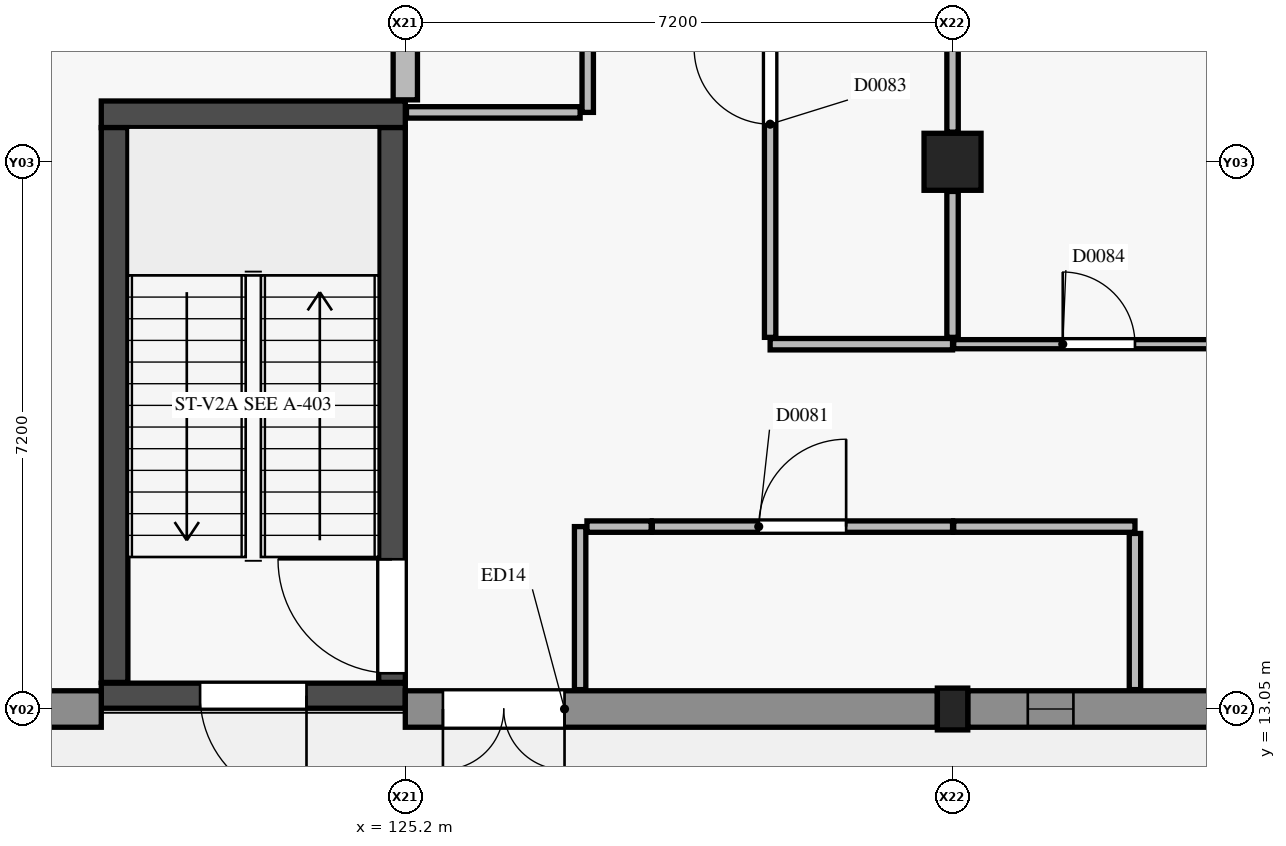
"""IFC4 building model, lengths in metres.
Left out: names, types, materials, properties, quantities, classifications, styles, units other than length and angle.
Written with IfcOpenShell. Run it as: python <this file> out.ifc"""

import sys

from ifc_helpers import new_model, si_unit, direction, frame, frame_2d, origin, origin_2d, place, context, subcontext, project, spatial, rectangle, extrude, element, fill, save


model = new_model("IFC4")
c1 = context("Model", 3, precision=1e-05, world=origin(), true_north=direction((0.0, 1.0)))
c2 = subcontext(c1, "Body", "Model", "MODEL_VIEW")
j1 = project(units=[si_unit("LENGTHUNIT", "METRE"), si_unit("PLANEANGLEUNIT", "RADIAN")], contexts=[c1])
p1 = place(None, origin())
s1 = spatial("IfcSite", under=j1, at=p1, CompositionType="ELEMENT")
p2 = place(p1, origin())
s2 = spatial("IfcBuilding", under=s1, at=p2, CompositionType="ELEMENT")
p3 = place(p2, origin())
s3 = spatial("IfcBuildingStorey", under=s2, at=p3, CompositionType="ELEMENT", Elevation=0.0)
p4 = place(p3, frame((132.4, 13.05, 0.0), z_axis=(0.0, 0.0, 1.0), x_axis=(1.0, 0.0, 0.0)))
e1 = element("IfcColumn", 1, at=p4, inside=s3, PredefinedType="COLUMN", context=c2, shape_type="SweptSolid", body=[
    extrude(rectangle(XDim=0.4, YDim=0.55, at=origin_2d()), origin(), (0.0, 0.0, 1.0), 4.8),
])
p5 = place(p3, frame((132.4, 20.25, 0.0), z_axis=(0.0, 0.0, 1.0), x_axis=(1.0, 0.0, 0.0)))
e2 = element("IfcColumn", 2, at=p5, inside=s3, PredefinedType="COLUMN", context=c2, shape_type="SweptSolid", body=[
    extrude(rectangle(XDim=0.75, YDim=0.75, at=origin_2d()), origin(), (0.0, 0.0, 1.0), 4.8),
])
p6 = place(p3, frame((125.2, 13.225, 0.0), z_axis=(0.0, 0.0, 1.0), x_axis=(-1.0, 0.0, 0.0)))
e3 = element("IfcWall", 3, at=p6, inside=s3, PredefinedType="SHEAR", context=c2, shape_type="SweptSolid", body=[
    extrude(rectangle(XDim=4.0, YDim=0.33, at=frame_2d((2.0, 0.0))), origin(), (0.0, 0.0, 1.0), 4.46),
])
p7 = place(p6, frame((1.3, 0.0, 0.0)))
e4 = element("IfcOpeningElement", 4, at=p7, cuts=e3, PredefinedType="OPENING", context=c2, shape_type="SweptSolid", body=[
    extrude(rectangle(XDim=1.4, YDim=2.25, at=frame_2d((0.7, 1.125))), frame((0.0, 0.175, 0.0), z_axis=(0.0, -1.0, 0.0), x_axis=(1.0, 0.0, 0.0)), (0.0, 0.0, 1.0), 0.35),
])
p8 = place(p3, frame((121.2, 20.875, 0.0), z_axis=(0.0, 0.0, 1.0), x_axis=(1.0, 0.0, 0.0)))
e5 = element("IfcWall", 5, at=p8, inside=s3, PredefinedType="SHEAR", context=c2, shape_type="SweptSolid", body=[
    extrude(rectangle(XDim=4.0, YDim=0.35, at=frame_2d((2.0, 0.0))), origin(), (0.0, 0.0, 1.0), 4.46),
])
p9 = place(p3, frame((121.375, 13.4, 0.0), z_axis=(0.0, 0.0, 1.0), x_axis=(0.0, 1.0, 0.0)))
e6 = element("IfcWall", 6, at=p9, inside=s3, PredefinedType="SHEAR", context=c2, shape_type="SweptSolid", body=[
    extrude(rectangle(XDim=7.3, YDim=0.35, at=frame_2d((3.65, 0.0))), origin(), (0.0, 0.0, 1.0), 4.46),
])
p10 = place(p3, frame((125.025, 13.4, 0.0), z_axis=(0.0, 0.0, 1.0), x_axis=(0.0, 1.0, 0.0)))
e7 = element("IfcWall", 7, at=p10, inside=s3, PredefinedType="SHEAR", context=c2, shape_type="SweptSolid", body=[
    extrude(rectangle(XDim=7.3, YDim=0.35, at=frame_2d((3.65, 0.0))), origin(), (0.0, 0.0, 1.0), 4.46),
])
p11 = place(p10, frame((0.12, 0.0, 0.0)))
e8 = element("IfcOpeningElement", 8, at=p11, cuts=e7, PredefinedType="OPENING", context=c2, shape_type="SweptSolid", body=[
    extrude(rectangle(XDim=1.5, YDim=2.15, at=frame_2d((0.75, 1.075))), frame((0.0, 0.185, 0.0), z_axis=(0.0, -1.0, 0.0), x_axis=(1.0, 0.0, 0.0)), (0.0, 0.0, 1.0), 0.37),
])
p12 = place(p3, frame((135.81, 13.05, 0.0), z_axis=(0.0, 0.0, 1.0), x_axis=(-1.0, 0.0, 0.0)))
e9 = element("IfcWall", 9, at=p12, inside=s3, PredefinedType="SOLIDWALL", context=c2, shape_type="SweptSolid", body=[
    extrude(rectangle(XDim=3.21, YDim=0.48, at=frame_2d((1.605, 0.0))), origin(), (0.0, 0.0, 1.0), 3.64),
])
p13 = place(p12, frame((1.82, 0.0, 0.9)))
e10 = element("IfcOpeningElement", 10, at=p13, cuts=e9, PredefinedType="OPENING", context=c2, shape_type="SweptSolid", body=[
    extrude(rectangle(XDim=0.6, YDim=1.8, at=frame_2d((0.3, 0.9))), frame((0.0, 0.25, 0.0), z_axis=(0.0, -1.0, 0.0), x_axis=(1.0, 0.0, 0.0)), (0.0, 0.0, 1.0), 0.5),
])
p14 = place(p3, frame((132.2, 13.05, 0.0), z_axis=(0.0, 0.0, 1.0), x_axis=(-1.0, 0.0, 0.0)))
e11 = element("IfcWall", 11, at=p14, inside=s3, PredefinedType="SOLIDWALL", context=c2, shape_type="SweptSolid", body=[
    extrude(rectangle(XDim=7.0, YDim=0.48, at=frame_2d((3.5, 0.0))), origin(), (0.0, 0.0, 1.0), 3.64),
])
p15 = place(p14, frame((4.905, 0.0, 0.0)))
e12 = element("IfcOpeningElement", 12, at=p15, cuts=e11, PredefinedType="OPENING", context=c2, shape_type="SweptSolid", body=[
    extrude(rectangle(XDim=1.6, YDim=2.3, at=frame_2d((0.8, 1.15))), frame((0.0, 0.25, 0.0), z_axis=(0.0, -1.0, 0.0), x_axis=(1.0, 0.0, 0.0)), (0.0, 0.0, 1.0), 0.5),
])
p16 = place(p3, frame((121.2, 13.05, 0.0), z_axis=(0.0, 0.0, 1.0), x_axis=(-1.0, 0.0, 0.0)))
e13 = element("IfcWall", 13, at=p16, inside=s3, PredefinedType="SOLIDWALL", context=c2, shape_type="SweptSolid", body=[
    extrude(rectangle(XDim=2.9, YDim=0.48, at=frame_2d((1.45, 0.0))), origin(), (0.0, 0.0, 1.0), 3.64),
])
p17 = place(p16, frame((1.075, 0.0, 0.9)))
e14 = element("IfcOpeningElement", 14, at=p17, cuts=e13, PredefinedType="OPENING", context=c2, shape_type="SweptSolid", body=[
    extrude(rectangle(XDim=0.75, YDim=1.8, at=frame_2d((0.375, 0.9))), frame((0.0, 0.25, 0.0), z_axis=(0.0, -1.0, 0.0), x_axis=(1.0, 0.0, 0.0)), (0.0, 0.0, 1.0), 0.5),
])
p18 = place(p3, frame((128.45, 15.45, 0.0), z_axis=(0.0, 0.0, 1.0), x_axis=(1.0, 0.0, 0.0)))
e15 = element("IfcWall", 15, at=p18, inside=s3, PredefinedType="PARTITIONING", context=c2, shape_type="SweptSolid", body=[
    extrude(rectangle(XDim=3.95, YDim=0.15, at=frame_2d((1.975, 0.0))), origin(), (0.0, 0.0, 1.0), 3.925),
])
p19 = place(p18, frame((1.4, 0.0, 0.0)))
e16 = element("IfcOpeningElement", 16, at=p19, cuts=e15, PredefinedType="OPENING", context=c2, shape_type="SweptSolid", body=[
    extrude(rectangle(XDim=1.15, YDim=2.15, at=frame_2d((0.575, 1.075))), frame((0.0, 0.085, 0.0), z_axis=(0.0, -1.0, 0.0), x_axis=(1.0, 0.0, 0.0)), (0.0, 0.0, 1.0), 0.17),
])
p20 = place(p3, frame((132.415, 15.45, 0.0), z_axis=(0.0, 0.0, 1.0), x_axis=(1.0, 0.0, 0.0)))
e17 = element("IfcWall", 17, at=p20, inside=s3, PredefinedType="PARTITIONING", context=c2, shape_type="SweptSolid", body=[
    extrude(rectangle(XDim=2.385, YDim=0.15, at=frame_2d((1.192, 0.0))), origin(), (0.0, 0.0, 1.0), 3.925),
])
p21 = place(p3, frame((134.8, 13.305, 0.0), z_axis=(0.0, 0.0, 1.0), x_axis=(0.0, 1.0, 0.0)))
e18 = element("IfcWall", 18, at=p21, inside=s3, PredefinedType="PARTITIONING", context=c2, shape_type="SweptSolid", body=[
    extrude(rectangle(XDim=2.055, YDim=0.15, at=frame_2d((1.028, 0.0))), origin(), (0.0, 0.0, 1.0), 4.46),
])
p22 = place(p3, frame((127.5, 13.305, 0.0), z_axis=(0.0, 0.0, 1.0), x_axis=(0.0, 1.0, 0.0)))
e19 = element("IfcWall", 19, at=p22, inside=s3, PredefinedType="PARTITIONING", context=c2, shape_type="SweptSolid", body=[
    extrude(rectangle(XDim=2.145, YDim=0.15, at=frame_2d((1.073, 0.0))), origin(), (0.0, 0.0, 1.0), 4.025),
])
p23 = place(p3, frame((127.59, 15.45, 0.0), z_axis=(0.0, 0.0, 1.0), x_axis=(1.0, 0.0, 0.0)))
e20 = element("IfcWall", 20, at=p23, inside=s3, PredefinedType="PARTITIONING", context=c2, shape_type="SweptSolid", body=[
    extrude(rectangle(XDim=0.845, YDim=0.15, at=frame_2d((0.422, 0.0))), origin(), (0.0, 0.0, 1.0), 4.025),
])
p24 = place(p3, frame((130.0, 17.85, 0.0), z_axis=(0.0, 0.0, 1.0), x_axis=(1.0, 0.0, 0.0)))
e21 = element("IfcWall", 21, at=p24, inside=s3, PredefinedType="PARTITIONING", context=c2, shape_type="SweptSolid", body=[
    extrude(rectangle(XDim=2.4, YDim=0.15, at=frame_2d((1.2, 0.0))), origin(), (0.0, 0.0, 1.0), 3.925),
])
p25 = place(p3, frame((130.0, 17.94, 0.0), z_axis=(0.0, 0.0, 1.0), x_axis=(0.0, 1.0, 0.0)))
e22 = element("IfcWall", 22, at=p25, inside=s3, PredefinedType="PARTITIONING", context=c2, shape_type="SweptSolid", body=[
    extrude(rectangle(XDim=6.61, YDim=0.15, at=frame_2d((3.305, 0.0))), origin(), (0.0, 0.0, 1.0), 3.645),
])
p26 = place(p25, frame((2.805, 0.0, 0.0)))
e23 = element("IfcOpeningElement", 23, at=p26, cuts=e22, PredefinedType="OPENING", context=c2, shape_type="SweptSolid", body=[
    extrude(rectangle(XDim=1.0, YDim=2.15, at=frame_2d((0.5, 1.075))), frame((0.0, 0.085, 0.0), z_axis=(0.0, -1.0, 0.0), x_axis=(1.0, 0.0, 0.0)), (0.0, 0.0, 1.0), 0.17),
])
p27 = place(p3, frame((125.215, 20.9, 0.0), z_axis=(0.0, 0.0, 1.0), x_axis=(1.0, 0.0, 0.0)))
e24 = element("IfcWall", 24, at=p27, inside=s3, PredefinedType="PARTITIONING", context=c2, shape_type="SweptSolid", body=[
    extrude(rectangle(XDim=2.285, YDim=0.15, at=frame_2d((1.143, 0.0))), origin(), (0.0, 0.0, 1.0), 4.46),
])
p28 = place(p3, frame((127.6, 20.9, 0.0), z_axis=(0.0, 0.0, 1.0), x_axis=(0.0, 1.0, 0.0)))
e25 = element("IfcWall", 25, at=p28, inside=s3, PredefinedType="PARTITIONING", context=c2, shape_type="SweptSolid", body=[
    extrude(rectangle(XDim=9.56, YDim=0.15, at=frame_2d((4.78, 0.0))), origin(), (0.0, 0.0, 1.0), 3.795),
])
p29 = place(p28, frame((4.28, 0.0, 0.0)))
e26 = element("IfcOpeningElement", 26, at=p29, cuts=e25, PredefinedType="OPENING", context=c2, shape_type="SweptSolid", body=[
    extrude(rectangle(XDim=1.0, YDim=2.15, at=frame_2d((0.5, 1.075))), frame((0.0, 0.085, 0.0), z_axis=(0.0, -1.0, 0.0), x_axis=(1.0, 0.0, 0.0)), (0.0, 0.0, 1.0), 0.17),
])
p30 = place(p3, frame((132.415, 17.85, 0.0), z_axis=(0.0, 0.0, 1.0), x_axis=(1.0, 0.0, 0.0)))
e27 = element("IfcWall", 27, at=p30, inside=s3, PredefinedType="PARTITIONING", context=c2, shape_type="SweptSolid", body=[
    extrude(rectangle(XDim=3.82, YDim=0.12, at=frame_2d((1.91, 0.0))), origin(), (0.0, 0.0, 1.0), 3.925),
])
p31 = place(p30, frame((1.435, 0.0, 0.0)))
e28 = element("IfcOpeningElement", 28, at=p31, cuts=e27, PredefinedType="OPENING", context=c2, shape_type="SweptSolid", body=[
    extrude(rectangle(XDim=0.95, YDim=2.1, at=frame_2d((0.475, 1.05))), frame((0.0, 0.07, 0.0), z_axis=(0.0, -1.0, 0.0), x_axis=(1.0, 0.0, 0.0)), (0.0, 0.0, 1.0), 0.14),
])
p32 = place(p3, frame((125.2, 21.065, 0.0), z_axis=(0.0, 0.0, 1.0), x_axis=(0.0, 1.0, 0.0)))
e29 = element("IfcWall", 29, at=p32, inside=s3, PredefinedType="PARTITIONING", context=c2, shape_type="SweptSolid", body=[
    extrude(rectangle(XDim=6.02, YDim=0.32, at=frame_2d((3.01, 0.0))), origin(), (0.0, 0.0, 1.0), 4.46),
])
p33 = place(p3, frame((132.4, 17.94, 0.0), z_axis=(0.0, 0.0, 1.0), x_axis=(0.0, 1.0, 0.0)))
e30 = element("IfcWall", 30, at=p33, inside=s3, PredefinedType="PARTITIONING", context=c2, shape_type="SweptSolid", body=[
    extrude(rectangle(XDim=1.92, YDim=0.15, at=frame_2d((0.96, 0.0))), origin(), (0.0, 0.0, 1.0), 3.925),
])
p34 = place(p3, frame((132.4, 20.64, 0.0), z_axis=(0.0, 0.0, 1.0), x_axis=(0.0, 1.0, 0.0)))
e31 = element("IfcWall", 31, at=p34, inside=s3, PredefinedType="PARTITIONING", context=c2, shape_type="SweptSolid", body=[
    extrude(rectangle(XDim=3.91, YDim=0.15, at=frame_2d((1.955, 0.0))), origin(), (0.0, 0.0, 1.0), 3.965),
])
p35 = place(p7, origin())
e32 = element("IfcDoor", 32, at=p35, inside=s3, OperationType="SINGLE_SWING_LEFT", PredefinedType="DOOR", context=c2, shape_type="SweptSolid", body=[
    extrude(rectangle(XDim=1.4, YDim=2.25, at=frame_2d((0.7, 1.125))), frame((0.0, 0.025, 0.0), z_axis=(0.0, -1.0, 0.0), x_axis=(1.0, 0.0, 0.0)), (0.0, 0.0, 1.0), 0.05),
])
fill(e4, e32)
p36 = place(p13, origin())
e33 = element("IfcWindow", 33, at=p36, inside=s3, PartitioningType="SINGLE_PANEL", PredefinedType="WINDOW", context=c2, shape_type="SweptSolid", body=[
    extrude(rectangle(XDim=0.6, YDim=1.8, at=frame_2d((0.3, 0.9))), frame((0.0, 0.03, 0.0), z_axis=(0.0, -1.0, 0.0), x_axis=(1.0, 0.0, 0.0)), (0.0, 0.0, 1.0), 0.06),
])
fill(e10, e33)
p37 = place(p15, origin())
e34 = element("IfcDoor", 34, at=p37, inside=s3, OperationType="DOUBLE_DOOR_SINGLE_SWING", PredefinedType="DOOR", context=c2, shape_type="SweptSolid", body=[
    extrude(rectangle(XDim=1.6, YDim=2.3, at=frame_2d((0.8, 1.15))), frame((0.0, 0.025, 0.0), z_axis=(0.0, -1.0, 0.0), x_axis=(1.0, 0.0, 0.0)), (0.0, 0.0, 1.0), 0.05),
])
fill(e12, e34)
p38 = place(p11, origin())
e35 = element("IfcDoor", 35, at=p38, inside=s3, OperationType="SINGLE_SWING_RIGHT", PredefinedType="DOOR", context=c2, shape_type="SweptSolid", body=[
    extrude(rectangle(XDim=1.5, YDim=2.15, at=frame_2d((0.75, 1.075))), frame((0.0, 0.025, 0.0), z_axis=(0.0, -1.0, 0.0), x_axis=(1.0, 0.0, 0.0)), (0.0, 0.0, 1.0), 0.05),
])
fill(e8, e35)
p39 = place(p19, origin())
e36 = element("IfcDoor", 36, at=p39, inside=s3, OperationType="SINGLE_SWING_RIGHT", PredefinedType="DOOR", context=c2, shape_type="SweptSolid", body=[
    extrude(rectangle(XDim=1.15, YDim=2.15, at=frame_2d((0.575, 1.075))), frame((0.0, 0.025, 0.0), z_axis=(0.0, -1.0, 0.0), x_axis=(1.0, 0.0, 0.0)), (0.0, 0.0, 1.0), 0.05),
])
fill(e16, e36)
p40 = place(p26, origin())
e37 = element("IfcDoor", 37, at=p40, inside=s3, OperationType="SINGLE_SWING_RIGHT", PredefinedType="DOOR", context=c2, shape_type="SweptSolid", body=[
    extrude(rectangle(XDim=1.0, YDim=2.15, at=frame_2d((0.5, 1.075))), frame((0.0, 0.025, 0.0), z_axis=(0.0, -1.0, 0.0), x_axis=(1.0, 0.0, 0.0)), (0.0, 0.0, 1.0), 0.05),
])
fill(e23, e37)
p41 = place(p31, origin())
e38 = element("IfcDoor", 38, at=p41, inside=s3, OperationType="SINGLE_SWING_LEFT", PredefinedType="DOOR", context=c2, shape_type="SweptSolid", body=[
    extrude(rectangle(XDim=0.95, YDim=2.1, at=frame_2d((0.475, 1.05))), frame((0.0, 0.025, 0.0), z_axis=(0.0, -1.0, 0.0), x_axis=(1.0, 0.0, 0.0)), (0.0, 0.0, 1.0), 0.05),
])
fill(e28, e38)
save(model, sys.argv[1])
